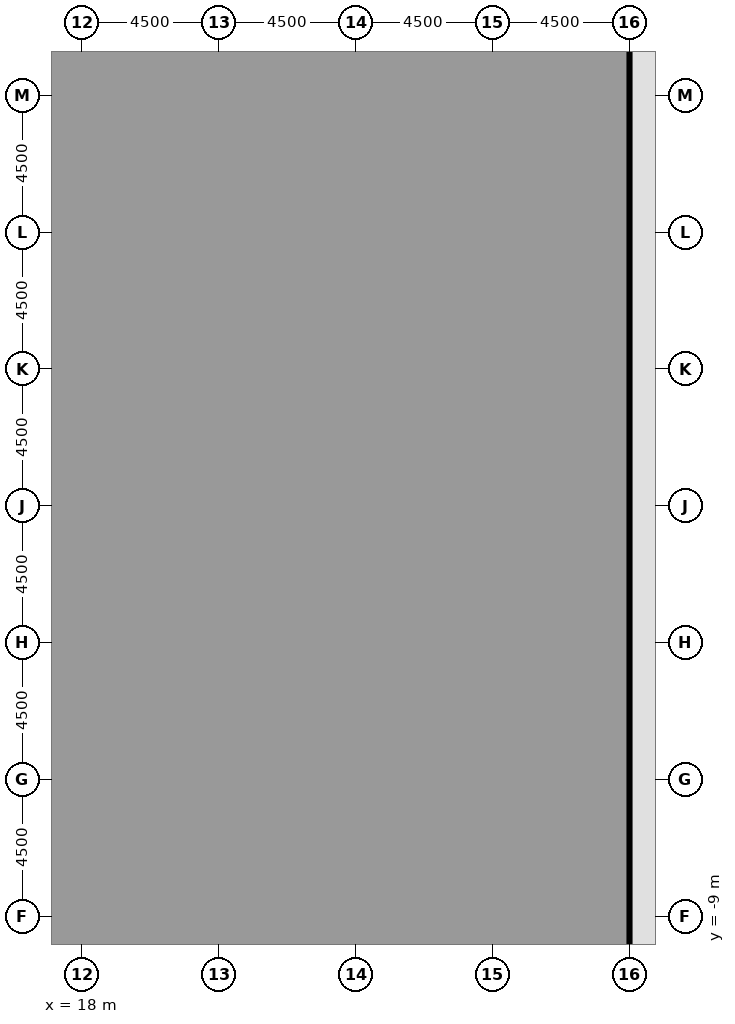
"""IFC4 building model, lengths in metres.
Left out: names, types, materials, properties, quantities, classifications, styles, units other than length and angle.
Written with IfcOpenShell. Run it as: python <this file> out.ifc"""

import sys

from ifc_helpers import new_model, si_unit, direction, frame, frame_2d, origin, origin_2d, place, context, subcontext, project, spatial, rectangle, extrude, element, fill, save


model = new_model("IFC4")
c1 = context("Model", 3, precision=1e-05, world=origin(), true_north=direction((0.0, 1.0)))
c2 = subcontext(c1, "Body", "Model", "MODEL_VIEW")
j1 = project(units=[si_unit("LENGTHUNIT", "METRE"), si_unit("PLANEANGLEUNIT", "RADIAN")], contexts=[c1])
p1 = place(None, origin())
s1 = spatial("IfcSite", under=j1, at=p1, CompositionType="ELEMENT")
p2 = place(p1, origin())
s2 = spatial("IfcBuilding", under=s1, at=p2, CompositionType="ELEMENT")
p3 = place(p2, origin())
s3 = spatial("IfcBuildingStorey", under=s2, at=p3, CompositionType="ELEMENT", Elevation=0.0)
for number, where, z_axis, x_axis in (
    (1, (36.0, -9.0, 0.0), (0.0, 0.0, 1.0), (1.0, 0.0, 0.0)),
    (2, (36.0, -4.5, 0.0), (0.0, 0.0, 1.0), (1.0, 0.0, 0.0)),
    (3, (36.0, 0.0, 0.0), (0.0, 0.0, 1.0), (1.0, 0.0, 0.0)),
    (4, (36.0, 4.5, 0.0), (0.0, 0.0, 1.0), (1.0, 0.0, 0.0)),
    (5, (36.0, 9.0, 0.0), (0.0, 0.0, 1.0), (1.0, 0.0, 0.0)),
    (6, (36.0, 13.5, 0.0), (0.0, 0.0, 1.0), (1.0, 0.0, 0.0)),
    (7, (36.0, 18.0, 0.0), (0.0, 0.0, 1.0), (1.0, 0.0, 0.0)),
):
    element("IfcColumn", number, at=place(p3, frame(where, z_axis=z_axis, x_axis=x_axis)), inside=s3, PredefinedType="COLUMN", context=c2, shape_type="SweptSolid", body=[
        extrude(rectangle(XDim=1.4, YDim=1.4, at=origin_2d()), origin(), (0.0, 0.0, 1.0), 7.2),
    ])
for number, where, z_axis, x_axis in (
    (8, (22.5, -9.0, 0.0), (0.0, 0.0, 1.0), (1.0, 0.0, 0.0)),
    (9, (22.5, 0.0, 0.0), (0.0, 0.0, 1.0), (1.0, 0.0, 0.0)),
    (10, (22.5, 9.0, 0.0), (0.0, 0.0, 1.0), (1.0, 0.0, 0.0)),
    (11, (22.5, 18.0, 0.0), (0.0, 0.0, 1.0), (1.0, 0.0, 0.0)),
):
    element("IfcColumn", number, at=place(p3, frame(where, z_axis=z_axis, x_axis=x_axis)), inside=s3, PredefinedType="COLUMN", context=c2, shape_type="SweptSolid", body=[
        extrude(rectangle(XDim=1.6, YDim=1.6, at=origin_2d()), origin(), (0.0, 0.0, 1.0), 7.2),
    ])
for number, where, z_axis, x_axis in (
    (12, (27.0, -9.0, 0.0), (0.0, 0.0, 1.0), (1.0, 0.0, 0.0)),
    (13, (27.0, 0.0, 0.0), (0.0, 0.0, 1.0), (1.0, 0.0, 0.0)),
    (14, (27.0, 9.0, 0.0), (0.0, 0.0, 1.0), (1.0, 0.0, 0.0)),
    (15, (27.0, 18.0, 0.0), (0.0, 0.0, 1.0), (1.0, 0.0, 0.0)),
):
    element("IfcColumn", number, at=place(p3, frame(where, z_axis=z_axis, x_axis=x_axis)), inside=s3, PredefinedType="COLUMN", context=c2, shape_type="SweptSolid", body=[
        extrude(rectangle(XDim=1.6, YDim=1.6, at=origin_2d()), origin(), (0.0, 0.0, 1.0), 6.75),
    ])
p4 = place(p3, frame((17.5, -9.0, 0.0), z_axis=(0.0, 0.0, 1.0), x_axis=(0.0, 1.0, 0.0)))
e16 = element("IfcWall", 16, at=p4, inside=s3, PredefinedType="SHEAR", context=c2, shape_type="SweptSolid", body=[
    extrude(rectangle(XDim=27.5, YDim=1.0, at=frame_2d((13.75, 0.0))), origin(), (0.0, 0.0, 1.0), 7.2),
])
p5 = place(p4, frame((12.55, 0.0, 0.0)))
e17 = element("IfcOpeningElement", 17, at=p5, cuts=e16, PredefinedType="OPENING", context=c2, shape_type="SweptSolid", body=[
    extrude(rectangle(XDim=2.4, YDim=2.4, at=frame_2d((1.2, 1.2))), frame((0.0, 0.51, 0.0), z_axis=(0.0, -1.0, 0.0), x_axis=(1.0, 0.0, 0.0)), (0.0, 0.0, 1.0), 1.02),
])
p6 = place(p4, frame((6.825, 0.0, 0.0)))
e18 = element("IfcOpeningElement", 18, at=p6, cuts=e16, PredefinedType="OPENING", context=c2, shape_type="SweptSolid", body=[
    extrude(rectangle(XDim=1.2, YDim=2.1, at=frame_2d((0.6, 1.05))), frame((0.0, 0.51, 0.0), z_axis=(0.0, -1.0, 0.0), x_axis=(1.0, 0.0, 0.0)), (0.0, 0.0, 1.0), 1.02),
])
p7 = place(p4, frame((19.475, 0.0, 0.0)))
e19 = element("IfcOpeningElement", 19, at=p7, cuts=e16, PredefinedType="OPENING", context=c2, shape_type="SweptSolid", body=[
    extrude(rectangle(XDim=1.2, YDim=2.1, at=frame_2d((0.6, 1.05))), frame((0.0, 0.51, 0.0), z_axis=(0.0, -1.0, 0.0), x_axis=(1.0, 0.0, 0.0)), (0.0, 0.0, 1.0), 1.02),
])
p8 = place(p3, frame((36.0, -9.7, 0.0), z_axis=(0.0, 0.0, 1.0), x_axis=(0.0, -1.0, 0.0)))
e20 = element("IfcWall", 20, at=p8, inside=s3, PredefinedType="SOLIDWALL", context=c2, shape_type="SweptSolid", body=[
    extrude(rectangle(XDim=3.1, YDim=0.35, at=frame_2d((1.55, 0.0))), origin(), (0.0, 0.0, 1.0), 5.85),
])
p9 = place(p3, frame((36.0, -5.2, 0.0), z_axis=(0.0, 0.0, 1.0), x_axis=(0.0, -1.0, 0.0)))
e21 = element("IfcWall", 21, at=p9, inside=s3, PredefinedType="SOLIDWALL", context=c2, shape_type="SweptSolid", body=[
    extrude(rectangle(XDim=3.1, YDim=0.35, at=frame_2d((1.55, 0.0))), origin(), (0.0, 0.0, 1.0), 5.85),
])
p10 = place(p9, frame((1.1, 0.0, 0.0)))
e22 = element("IfcOpeningElement", 22, at=p10, cuts=e21, PredefinedType="OPENING", context=c2, shape_type="SweptSolid", body=[
    extrude(rectangle(XDim=1.8, YDim=2.1, at=frame_2d((0.9, 1.05))), frame((0.0, 0.185, 0.0), z_axis=(0.0, -1.0, 0.0), x_axis=(1.0, 0.0, 0.0)), (0.0, 0.0, 1.0), 0.37),
])
for number, where, z_axis, x_axis in (
    (23, (36.0, -0.7, 0.0), (0.0, 0.0, 1.0), (0.0, -1.0, 0.0)),
    (24, (36.0, 3.8, 0.0), (0.0, 0.0, 1.0), (0.0, -1.0, 0.0)),
    (25, (36.0, 8.3, 0.0), (0.0, 0.0, 1.0), (0.0, -1.0, 0.0)),
    (26, (36.0, 12.8, 0.0), (0.0, 0.0, 1.0), (0.0, -1.0, 0.0)),
):
    element("IfcWall", number, at=place(p3, frame(where, z_axis=z_axis, x_axis=x_axis)), inside=s3, PredefinedType="SOLIDWALL", context=c2, shape_type="SweptSolid", body=[
        extrude(rectangle(XDim=3.1, YDim=0.35, at=frame_2d((1.55, 0.0))), origin(), (0.0, 0.0, 1.0), 5.85),
    ])
p11 = place(p3, frame((36.0, 17.3, 0.0), z_axis=(0.0, 0.0, 1.0), x_axis=(0.0, -1.0, 0.0)))
e27 = element("IfcWall", 27, at=p11, inside=s3, PredefinedType="SOLIDWALL", context=c2, shape_type="SweptSolid", body=[
    extrude(rectangle(XDim=3.1, YDim=0.35, at=frame_2d((1.55, 0.0))), origin(), (0.0, 0.0, 1.0), 5.85),
])
p12 = place(p11, frame((0.65, 0.0, 0.0)))
e28 = element("IfcOpeningElement", 28, at=p12, cuts=e27, PredefinedType="OPENING", context=c2, shape_type="SweptSolid", body=[
    extrude(rectangle(XDim=1.8, YDim=2.1, at=frame_2d((0.9, 1.05))), frame((0.0, 0.185, 0.0), z_axis=(0.0, -1.0, 0.0), x_axis=(1.0, 0.0, 0.0)), (0.0, 0.0, 1.0), 0.37),
])
p13 = place(p3, frame((36.0, 21.8, 0.0), z_axis=(0.0, 0.0, 1.0), x_axis=(0.0, -1.0, 0.0)))
e29 = element("IfcWall", 29, at=p13, inside=s3, PredefinedType="SOLIDWALL", context=c2, shape_type="SweptSolid", body=[
    extrude(rectangle(XDim=3.1, YDim=0.35, at=frame_2d((1.55, 0.0))), origin(), (0.0, 0.0, 1.0), 5.85),
])
p14 = place(p3, frame((22.5, -17.15, 0.0), z_axis=(0.0, 0.0, 1.0), x_axis=(0.0, 1.0, 0.0)))
e30 = element("IfcWall", 30, at=p14, inside=s3, PredefinedType="PARTITIONING", context=c2, shape_type="SweptSolid", body=[
    extrude(rectangle(XDim=7.3, YDim=0.15, at=frame_2d((3.65, 0.0))), origin(), (0.0, 0.0, 1.0), 6.75),
])
p15 = place(p3, frame((18.0, -9.0, 0.0), z_axis=(0.0, 0.0, 1.0), x_axis=(1.0, 0.0, 0.0)))
e31 = element("IfcWall", 31, at=p15, inside=s3, PredefinedType="PARTITIONING", context=c2, shape_type="SweptSolid", body=[
    extrude(rectangle(XDim=2.2, YDim=0.15, at=frame_2d((1.1, 0.0))), origin(), (0.0, 0.0, 1.0), 6.75),
])
p16 = place(p15, frame((0.25, 0.0, 0.0)))
e32 = element("IfcOpeningElement", 32, at=p16, cuts=e31, PredefinedType="OPENING", context=c2, shape_type="SweptSolid", body=[
    extrude(rectangle(XDim=1.7, YDim=2.1, at=frame_2d((0.85, 1.05))), frame((0.0, 0.085, 0.0), z_axis=(0.0, -1.0, 0.0), x_axis=(1.0, 0.0, 0.0)), (0.0, 0.0, 1.0), 0.17),
])
p17 = place(p3, frame((20.2, -9.0, 0.0), z_axis=(0.0, 0.0, 1.0), x_axis=(1.0, 0.0, 0.0)))
e33 = element("IfcWall", 33, at=p17, inside=s3, PredefinedType="PARTITIONING", context=c2, shape_type="SweptSolid", body=[
    extrude(rectangle(XDim=1.45, YDim=0.15, at=frame_2d((0.725, 0.0))), origin(), (0.0, 0.0, 1.0), 6.75),
])
p18 = place(p3, frame((27.85, -9.0, 0.0), z_axis=(0.0, 0.0, 1.0), x_axis=(1.0, 0.0, 0.0)))
e34 = element("IfcWall", 34, at=p18, inside=s3, PredefinedType="PARTITIONING", context=c2, shape_type="SweptSolid", body=[
    extrude(rectangle(XDim=7.4, YDim=0.15, at=frame_2d((3.7, 0.0))), origin(), (0.0, 0.0, 1.0), 6.75),
])
p19 = place(p3, frame((23.35, -9.0, 0.0), z_axis=(0.0, 0.0, 1.0), x_axis=(1.0, 0.0, 0.0)))
e35 = element("IfcWall", 35, at=p19, inside=s3, PredefinedType="PARTITIONING", context=c2, shape_type="SweptSolid", body=[
    extrude(rectangle(XDim=2.8, YDim=0.15, at=frame_2d((1.4, 0.0))), origin(), (0.0, 0.0, 1.0), 6.75),
])
p20 = place(p3, frame((20.2, -9.0, 0.0), z_axis=(0.0, 0.0, 1.0), x_axis=(0.0, 1.0, 0.0)))
e36 = element("IfcWall", 36, at=p20, inside=s3, PredefinedType="PARTITIONING", context=c2, shape_type="SweptSolid", body=[
    extrude(rectangle(XDim=3.0, YDim=0.15, at=frame_2d((1.5, 0.0))), origin(), (0.0, 0.0, 1.0), 6.75),
])
p21 = place(p20, frame((0.3, 0.0, 0.0)))
e37 = element("IfcOpeningElement", 37, at=p21, cuts=e36, PredefinedType="OPENING", context=c2, shape_type="SweptSolid", body=[
    extrude(rectangle(XDim=2.4, YDim=2.4, at=frame_2d((1.2, 1.2))), frame((0.0, 0.085, 0.0), z_axis=(0.0, -1.0, 0.0), x_axis=(1.0, 0.0, 0.0)), (0.0, 0.0, 1.0), 0.17),
])
p22 = place(p3, frame((20.2, -6.0, 0.0), z_axis=(0.0, 0.0, 1.0), x_axis=(0.0, 1.0, 0.0)))
e38 = element("IfcWall", 38, at=p22, inside=s3, PredefinedType="PARTITIONING", context=c2, shape_type="SweptSolid", body=[
    extrude(rectangle(XDim=6.0, YDim=0.15, at=frame_2d((3.0, 0.0))), origin(), (0.0, 0.0, 1.0), 6.75),
])
p23 = place(p22, frame((2.5, 0.0, 0.0)))
e39 = element("IfcOpeningElement", 39, at=p23, cuts=e38, PredefinedType="OPENING", context=c2, shape_type="SweptSolid", body=[
    extrude(rectangle(XDim=1.0, YDim=2.1, at=frame_2d((0.5, 1.05))), frame((0.0, 0.085, 0.0), z_axis=(0.0, -1.0, 0.0), x_axis=(1.0, 0.0, 0.0)), (0.0, 0.0, 1.0), 0.17),
])
p24 = place(p3, frame((20.2, 0.0, 0.0), z_axis=(0.0, 0.0, 1.0), x_axis=(0.0, 1.0, 0.0)))
e40 = element("IfcWall", 40, at=p24, inside=s3, PredefinedType="PARTITIONING", context=c2, shape_type="SweptSolid", body=[
    extrude(rectangle(XDim=9.0, YDim=0.15, at=frame_2d((4.5, 0.0))), origin(), (0.0, 0.0, 1.0), 6.75),
])
p25 = place(p24, frame((4.0, 0.0, 0.0)))
e41 = element("IfcOpeningElement", 41, at=p25, cuts=e40, PredefinedType="OPENING", context=c2, shape_type="SweptSolid", body=[
    extrude(rectangle(XDim=1.0, YDim=2.1, at=frame_2d((0.5, 1.05))), frame((0.0, 0.085, 0.0), z_axis=(0.0, -1.0, 0.0), x_axis=(1.0, 0.0, 0.0)), (0.0, 0.0, 1.0), 0.17),
])
p26 = place(p3, frame((20.2, 9.0, 0.0), z_axis=(0.0, 0.0, 1.0), x_axis=(0.0, 1.0, 0.0)))
e42 = element("IfcWall", 42, at=p26, inside=s3, PredefinedType="PARTITIONING", context=c2, shape_type="SweptSolid", body=[
    extrude(rectangle(XDim=5.6, YDim=0.15, at=frame_2d((2.8, 0.0))), origin(), (0.0, 0.0, 1.0), 6.75),
])
p27 = place(p26, frame((2.3, 0.0, 0.0)))
e43 = element("IfcOpeningElement", 43, at=p27, cuts=e42, PredefinedType="OPENING", context=c2, shape_type="SweptSolid", body=[
    extrude(rectangle(XDim=1.0, YDim=2.1, at=frame_2d((0.5, 1.05))), frame((0.0, 0.085, 0.0), z_axis=(0.0, -1.0, 0.0), x_axis=(1.0, 0.0, 0.0)), (0.0, 0.0, 1.0), 0.17),
])
p28 = place(p3, frame((20.2, 14.6, 0.0), z_axis=(0.0, 0.0, 1.0), x_axis=(0.0, 1.0, 0.0)))
e44 = element("IfcWall", 44, at=p28, inside=s3, PredefinedType="PARTITIONING", context=c2, shape_type="SweptSolid", body=[
    extrude(rectangle(XDim=3.9, YDim=0.15, at=frame_2d((1.95, 0.0))), origin(), (0.0, 0.0, 1.0), 6.75),
])
p29 = place(p28, frame((0.75, 0.0, 0.0)))
e45 = element("IfcOpeningElement", 45, at=p29, cuts=e44, PredefinedType="OPENING", context=c2, shape_type="SweptSolid", body=[
    extrude(rectangle(XDim=2.4, YDim=2.4, at=frame_2d((1.2, 1.2))), frame((0.0, 0.085, 0.0), z_axis=(0.0, -1.0, 0.0), x_axis=(1.0, 0.0, 0.0)), (0.0, 0.0, 1.0), 0.17),
])
p30 = place(p3, frame((18.0, 18.5, 0.0), z_axis=(0.0, 0.0, 1.0), x_axis=(1.0, 0.0, 0.0)))
e46 = element("IfcWall", 46, at=p30, inside=s3, PredefinedType="PARTITIONING", context=c2, shape_type="SweptSolid", body=[
    extrude(rectangle(XDim=2.2, YDim=0.15, at=frame_2d((1.1, 0.0))), origin(), (0.0, 0.0, 1.0), 6.75),
])
p31 = place(p30, frame((0.25, 0.0, 0.0)))
e47 = element("IfcOpeningElement", 47, at=p31, cuts=e46, PredefinedType="OPENING", context=c2, shape_type="SweptSolid", body=[
    extrude(rectangle(XDim=1.7, YDim=2.1, at=frame_2d((0.85, 1.05))), frame((0.0, 0.085, 0.0), z_axis=(0.0, -1.0, 0.0), x_axis=(1.0, 0.0, 0.0)), (0.0, 0.0, 1.0), 0.17),
])
p32 = place(p3, frame((20.2, -6.0, 0.0), z_axis=(0.0, 0.0, 1.0), x_axis=(1.0, 0.0, 0.0)))
e48 = element("IfcWall", 48, at=p32, inside=s3, PredefinedType="PARTITIONING", context=c2, shape_type="SweptSolid", body=[
    extrude(rectangle(XDim=15.625, YDim=0.15, at=frame_2d((7.812, 0.0))), origin(), (0.0, 0.0, 1.0), 6.75),
])
p33 = place(p3, frame((27.85, 0.0, 0.0), z_axis=(0.0, 0.0, 1.0), x_axis=(1.0, 0.0, 0.0)))
e49 = element("IfcWall", 49, at=p33, inside=s3, PredefinedType="PARTITIONING", context=c2, shape_type="SweptSolid", body=[
    extrude(rectangle(XDim=7.4, YDim=0.15, at=frame_2d((3.7, 0.0))), origin(), (0.0, 0.0, 1.0), 6.75),
])
p34 = place(p3, frame((23.35, 0.0, 0.0), z_axis=(0.0, 0.0, 1.0), x_axis=(1.0, 0.0, 0.0)))
e50 = element("IfcWall", 50, at=p34, inside=s3, PredefinedType="PARTITIONING", context=c2, shape_type="SweptSolid", body=[
    extrude(rectangle(XDim=2.8, YDim=0.15, at=frame_2d((1.4, 0.0))), origin(), (0.0, 0.0, 1.0), 6.75),
])
p35 = place(p3, frame((20.2, 0.0, 0.0), z_axis=(0.0, 0.0, 1.0), x_axis=(1.0, 0.0, 0.0)))
e51 = element("IfcWall", 51, at=p35, inside=s3, PredefinedType="PARTITIONING", context=c2, shape_type="SweptSolid", body=[
    extrude(rectangle(XDim=1.45, YDim=0.15, at=frame_2d((0.725, 0.0))), origin(), (0.0, 0.0, 1.0), 6.75),
])
p36 = place(p3, frame((27.85, 9.0, 0.0), z_axis=(0.0, 0.0, 1.0), x_axis=(1.0, 0.0, 0.0)))
e52 = element("IfcWall", 52, at=p36, inside=s3, PredefinedType="PARTITIONING", context=c2, shape_type="SweptSolid", body=[
    extrude(rectangle(XDim=7.4, YDim=0.15, at=frame_2d((3.7, 0.0))), origin(), (0.0, 0.0, 1.0), 6.75),
])
p37 = place(p3, frame((23.35, 9.0, 0.0), z_axis=(0.0, 0.0, 1.0), x_axis=(1.0, 0.0, 0.0)))
e53 = element("IfcWall", 53, at=p37, inside=s3, PredefinedType="PARTITIONING", context=c2, shape_type="SweptSolid", body=[
    extrude(rectangle(XDim=2.8, YDim=0.15, at=frame_2d((1.4, 0.0))), origin(), (0.0, 0.0, 1.0), 6.75),
])
p38 = place(p3, frame((20.2, 9.0, 0.0), z_axis=(0.0, 0.0, 1.0), x_axis=(1.0, 0.0, 0.0)))
e54 = element("IfcWall", 54, at=p38, inside=s3, PredefinedType="PARTITIONING", context=c2, shape_type="SweptSolid", body=[
    extrude(rectangle(XDim=1.45, YDim=0.15, at=frame_2d((0.725, 0.0))), origin(), (0.0, 0.0, 1.0), 6.75),
])
p39 = place(p3, frame((20.2, 14.6, 0.0), z_axis=(0.0, 0.0, 1.0), x_axis=(1.0, 0.0, 0.0)))
e55 = element("IfcWall", 55, at=p39, inside=s3, PredefinedType="PARTITIONING", context=c2, shape_type="SweptSolid", body=[
    extrude(rectangle(XDim=15.625, YDim=0.15, at=frame_2d((7.812, 0.0))), origin(), (0.0, 0.0, 1.0), 6.75),
])
p40 = place(p3, frame((27.85, 18.5, 0.0), z_axis=(0.0, 0.0, 1.0), x_axis=(1.0, 0.0, 0.0)))
e56 = element("IfcWall", 56, at=p40, inside=s3, PredefinedType="PARTITIONING", context=c2, shape_type="SweptSolid", body=[
    extrude(rectangle(XDim=7.4, YDim=0.15, at=frame_2d((3.7, 0.0))), origin(), (0.0, 0.0, 1.0), 6.75),
])
p41 = place(p3, frame((23.35, 18.5, 0.0), z_axis=(0.0, 0.0, 1.0), x_axis=(1.0, 0.0, 0.0)))
e57 = element("IfcWall", 57, at=p41, inside=s3, PredefinedType="PARTITIONING", context=c2, shape_type="SweptSolid", body=[
    extrude(rectangle(XDim=2.8, YDim=0.15, at=frame_2d((1.4, 0.0))), origin(), (0.0, 0.0, 1.0), 6.75),
])
p42 = place(p3, frame((20.2, 18.5, 0.0), z_axis=(0.0, 0.0, 1.0), x_axis=(1.0, 0.0, 0.0)))
e58 = element("IfcWall", 58, at=p42, inside=s3, PredefinedType="PARTITIONING", context=c2, shape_type="SweptSolid", body=[
    extrude(rectangle(XDim=1.45, YDim=0.15, at=frame_2d((0.725, 0.0))), origin(), (0.0, 0.0, 1.0), 6.75),
])
p43 = place(p5, origin())
e59 = element("IfcDoor", 59, at=p43, inside=s3, OperationType="DOUBLE_DOOR_DOUBLE_SWING", PredefinedType="DOOR", context=c2, shape_type="SweptSolid", body=[
    extrude(rectangle(XDim=2.4, YDim=2.4, at=frame_2d((1.2, 1.2))), frame((0.0, 0.025, 0.0), z_axis=(0.0, -1.0, 0.0), x_axis=(1.0, 0.0, 0.0)), (0.0, 0.0, 1.0), 0.05),
])
fill(e17, e59)
p44 = place(p6, frame((1.2, 0.0, 0.0), z_axis=(0.0, 0.0, 1.0), x_axis=(-1.0, 0.0, 0.0)))
e60 = element("IfcDoor", 60, at=p44, inside=s3, OperationType="SINGLE_SWING_LEFT", PredefinedType="DOOR", context=c2, shape_type="SweptSolid", body=[
    extrude(rectangle(XDim=1.2, YDim=2.1, at=frame_2d((0.6, 1.05))), frame((0.0, 0.025, 0.0), z_axis=(0.0, -1.0, 0.0), x_axis=(1.0, 0.0, 0.0)), (0.0, 0.0, 1.0), 0.05),
])
fill(e18, e60)
p45 = place(p7, frame((1.2, 0.0, 0.0), z_axis=(0.0, 0.0, 1.0), x_axis=(-1.0, 0.0, 0.0)))
e61 = element("IfcDoor", 61, at=p45, inside=s3, OperationType="SINGLE_SWING_LEFT", PredefinedType="DOOR", context=c2, shape_type="SweptSolid", body=[
    extrude(rectangle(XDim=1.2, YDim=2.1, at=frame_2d((0.6, 1.05))), frame((0.0, 0.025, 0.0), z_axis=(0.0, -1.0, 0.0), x_axis=(1.0, 0.0, 0.0)), (0.0, 0.0, 1.0), 0.05),
])
fill(e19, e61)
p46 = place(p23, origin())
e62 = element("IfcDoor", 62, at=p46, inside=s3, OperationType="SINGLE_SWING_LEFT", PredefinedType="DOOR", context=c2, shape_type="SweptSolid", body=[
    extrude(rectangle(XDim=1.0, YDim=2.1, at=frame_2d((0.5, 1.05))), frame((0.0, 0.025, 0.0), z_axis=(0.0, -1.0, 0.0), x_axis=(1.0, 0.0, 0.0)), (0.0, 0.0, 1.0), 0.05),
])
fill(e39, e62)
p47 = place(p25, origin())
e63 = element("IfcDoor", 63, at=p47, inside=s3, OperationType="SINGLE_SWING_RIGHT", PredefinedType="DOOR", context=c2, shape_type="SweptSolid", body=[
    extrude(rectangle(XDim=1.0, YDim=2.1, at=frame_2d((0.5, 1.05))), frame((0.0, 0.025, 0.0), z_axis=(0.0, -1.0, 0.0), x_axis=(1.0, 0.0, 0.0)), (0.0, 0.0, 1.0), 0.05),
])
fill(e41, e63)
p48 = place(p27, origin())
e64 = element("IfcDoor", 64, at=p48, inside=s3, OperationType="SINGLE_SWING_LEFT", PredefinedType="DOOR", context=c2, shape_type="SweptSolid", body=[
    extrude(rectangle(XDim=1.0, YDim=2.1, at=frame_2d((0.5, 1.05))), frame((0.0, 0.025, 0.0), z_axis=(0.0, -1.0, 0.0), x_axis=(1.0, 0.0, 0.0)), (0.0, 0.0, 1.0), 0.05),
])
fill(e43, e64)
p49 = place(p16, origin())
e65 = element("IfcDoor", 65, at=p49, inside=s3, OperationType="DOUBLE_DOOR_DOUBLE_SWING", PredefinedType="DOOR", context=c2, shape_type="SweptSolid", body=[
    extrude(rectangle(XDim=1.7, YDim=2.1, at=frame_2d((0.85, 1.05))), frame((0.0, 0.025, 0.0), z_axis=(0.0, -1.0, 0.0), x_axis=(1.0, 0.0, 0.0)), (0.0, 0.0, 1.0), 0.05),
])
fill(e32, e65)
p50 = place(p21, origin())
e66 = element("IfcDoor", 66, at=p50, inside=s3, OperationType="DOUBLE_DOOR_DOUBLE_SWING", PredefinedType="DOOR", context=c2, shape_type="SweptSolid", body=[
    extrude(rectangle(XDim=2.4, YDim=2.4, at=frame_2d((1.2, 1.2))), frame((0.0, 0.025, 0.0), z_axis=(0.0, -1.0, 0.0), x_axis=(1.0, 0.0, 0.0)), (0.0, 0.0, 1.0), 0.05),
])
fill(e37, e66)
p51 = place(p29, origin())
e67 = element("IfcDoor", 67, at=p51, inside=s3, OperationType="DOUBLE_DOOR_DOUBLE_SWING", PredefinedType="DOOR", context=c2, shape_type="SweptSolid", body=[
    extrude(rectangle(XDim=2.4, YDim=2.4, at=frame_2d((1.2, 1.2))), frame((0.0, 0.025, 0.0), z_axis=(0.0, -1.0, 0.0), x_axis=(1.0, 0.0, 0.0)), (0.0, 0.0, 1.0), 0.05),
])
fill(e45, e67)
p52 = place(p31, origin())
e68 = element("IfcDoor", 68, at=p52, inside=s3, OperationType="DOUBLE_DOOR_DOUBLE_SWING", PredefinedType="DOOR", context=c2, shape_type="SweptSolid", body=[
    extrude(rectangle(XDim=1.7, YDim=2.1, at=frame_2d((0.85, 1.05))), frame((0.0, 0.025, 0.0), z_axis=(0.0, -1.0, 0.0), x_axis=(1.0, 0.0, 0.0)), (0.0, 0.0, 1.0), 0.05),
])
fill(e47, e68)
p53 = place(p10, origin())
e69 = element("IfcDoor", 69, at=p53, inside=s3, OperationType="DOUBLE_DOOR_DOUBLE_SWING", PredefinedType="DOOR", context=c2, shape_type="SweptSolid", body=[
    extrude(rectangle(XDim=1.8, YDim=2.1, at=frame_2d((0.9, 1.05))), frame((0.0, 0.025, 0.0), z_axis=(0.0, -1.0, 0.0), x_axis=(1.0, 0.0, 0.0)), (0.0, 0.0, 1.0), 0.05),
])
fill(e22, e69)
p54 = place(p12, origin())
e70 = element("IfcDoor", 70, at=p54, inside=s3, OperationType="DOUBLE_DOOR_DOUBLE_SWING", PredefinedType="DOOR", context=c2, shape_type="SweptSolid", body=[
    extrude(rectangle(XDim=1.8, YDim=2.1, at=frame_2d((0.9, 1.05))), frame((0.0, 0.025, 0.0), z_axis=(0.0, -1.0, 0.0), x_axis=(1.0, 0.0, 0.0)), (0.0, 0.0, 1.0), 0.05),
])
fill(e28, e70)
save(model, sys.argv[1])
